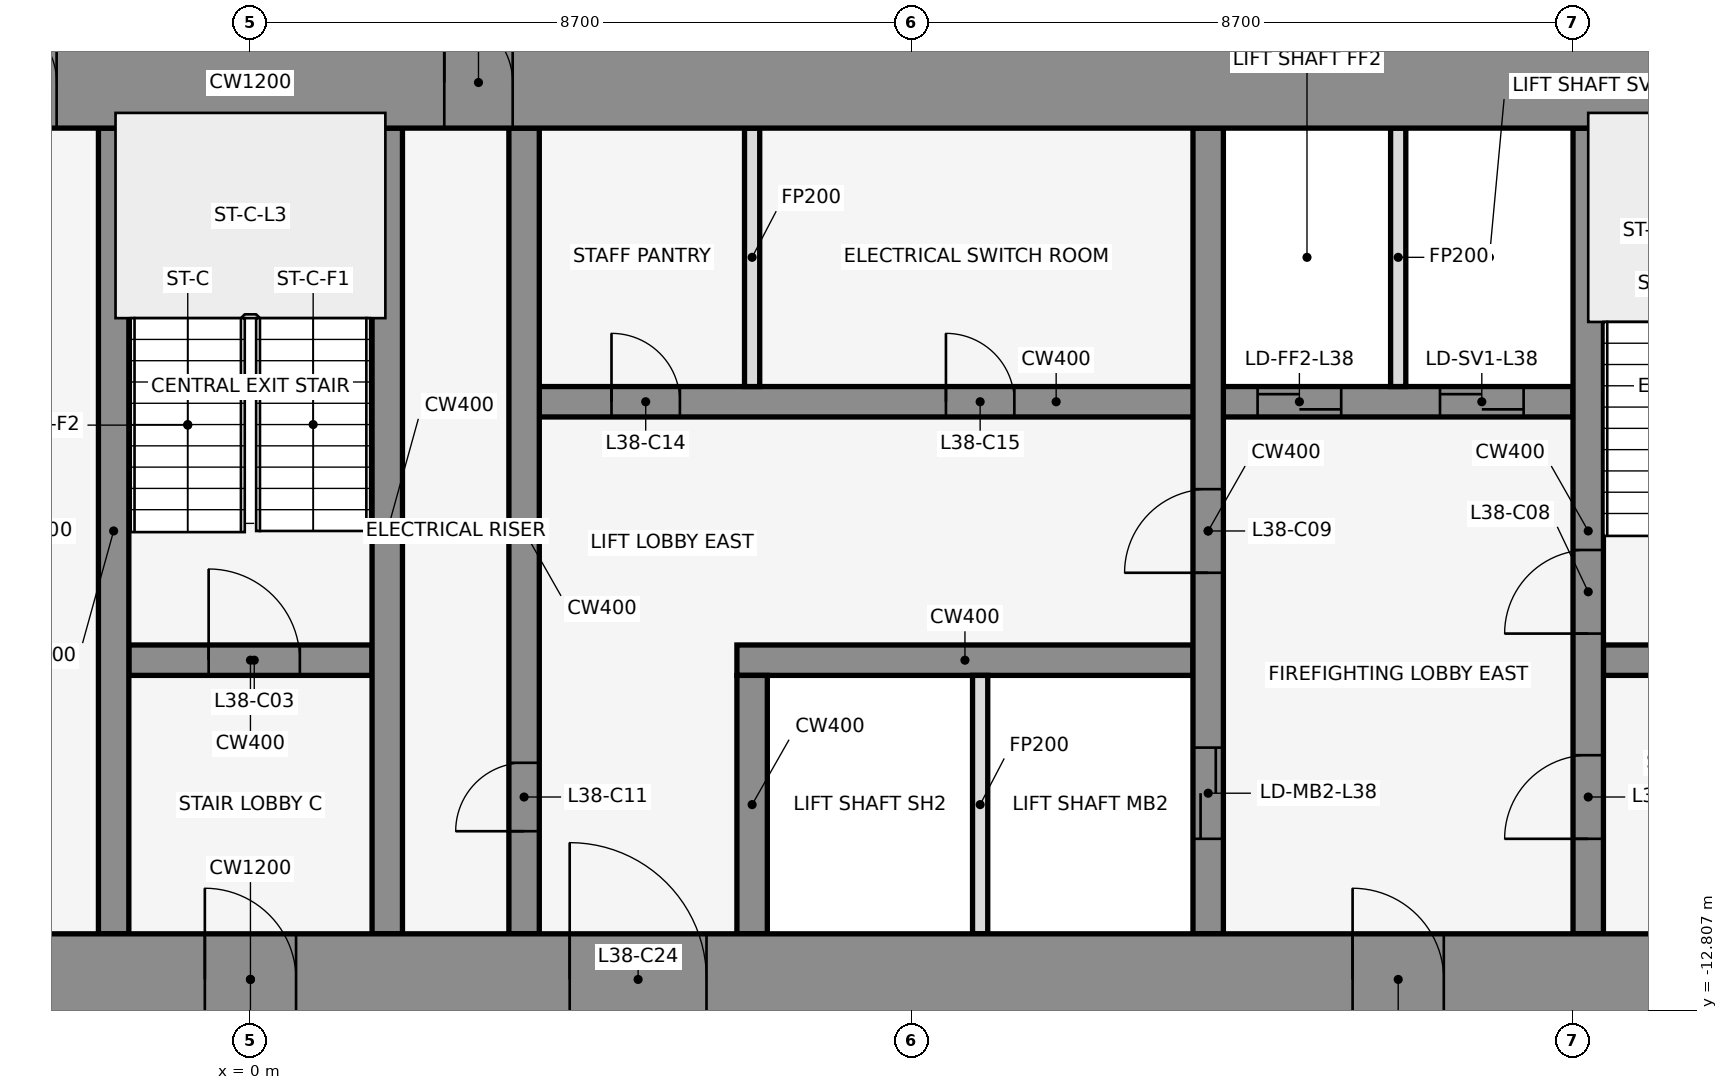
"""IFC4 building model, lengths in metres.
Left out: names, types, materials, properties, quantities, classifications, styles, units other than length and angle.
Written with IfcOpenShell. Run it as: python <this file> out.ifc"""

import sys

from ifc_helpers import new_model, si_unit, direction, frame, frame_2d, origin, place, context, subcontext, project, spatial, rectangle, extrude, element, fill, save


model = new_model("IFC4")
c1 = context("Model", 3, precision=1e-05, world=origin(), true_north=direction((0.0, 1.0)))
c2 = subcontext(c1, "Body", "Model", "MODEL_VIEW")
j1 = project(units=[si_unit("LENGTHUNIT", "METRE"), si_unit("PLANEANGLEUNIT", "RADIAN")], contexts=[c1])
p1 = place(None, origin())
s1 = spatial("IfcSite", under=j1, at=p1, CompositionType="ELEMENT")
p2 = place(p1, origin())
s2 = spatial("IfcBuilding", under=s1, at=p2, CompositionType="ELEMENT")
p3 = place(p2, frame((0.0, 0.0, 173.2)))
s3 = spatial("IfcBuildingStorey", under=s2, at=p3, CompositionType="ELEMENT", Elevation=173.2)
for number, where, z_axis, x_axis in (
    (1, (16.432, -0.105, 0.0), (0.0, 0.0, 1.0), (-0.84, 0.543, 0.0)),
    (2, (1.901, 1.08, 0.0), (0.0, 0.0, 1.0), (-0.84, -0.543, 0.0)),
    (3, (-0.068, -0.105, 0.0), (0.0, 0.0, 1.0), (-0.84, 0.543, 0.0)),
):
    element("IfcWall", number, at=place(p3, frame(where, z_axis=z_axis, x_axis=x_axis)), inside=s3, PredefinedType="STANDARD", context=c2, shape_type="SweptSolid", body=[
        extrude(rectangle(XDim=2.183, YDim=0.25, at=frame_2d((1.091, 0.0))), origin(), (0.0, 0.0, 1.0), 3.95),
    ])
p4 = place(p3, frame((-1.6, -8.2, 0.0), z_axis=(0.0, 0.0, 1.0), x_axis=(1.0, 0.0, 0.0)))
e4 = element("IfcWall", 4, at=p4, inside=s3, PredefinedType="SHEAR", context=c2, shape_type="SweptSolid", body=[
    extrude(rectangle(XDim=3.2, YDim=0.4, at=frame_2d((1.6, 0.0))), origin(), (0.0, 0.0, 1.0), 4.1),
])
p5 = place(p4, frame((1.05, 0.0, 0.0)))
e5 = element("IfcOpeningElement", 5, at=p5, cuts=e4, PredefinedType="OPENING", context=c2, shape_type="SweptSolid", body=[
    extrude(rectangle(XDim=1.2, YDim=2.1, at=frame_2d((0.6, 1.05))), frame((0.0, 0.212, 0.0), z_axis=(0.0, -1.0, 0.0), x_axis=(1.0, 0.0, 0.0)), (0.0, 0.0, 1.0), 0.424),
])
p6 = place(p3, frame((6.4, -8.2, 0.0), z_axis=(0.0, 0.0, 1.0), x_axis=(1.0, 0.0, 0.0)))
e6 = element("IfcWall", 6, at=p6, inside=s3, PredefinedType="SHEAR", context=c2, shape_type="SweptSolid", body=[
    extrude(rectangle(XDim=6.0, YDim=0.4, at=frame_2d((3.0, 0.0))), origin(), (0.0, 0.0, 1.0), 4.1),
])
p7 = place(p3, frame((17.8, -8.2, 0.0), z_axis=(0.0, 0.0, 1.0), x_axis=(1.0, 0.0, 0.0)))
e7 = element("IfcWall", 7, at=p7, inside=s3, PredefinedType="SHEAR", context=c2, shape_type="SweptSolid", body=[
    extrude(rectangle(XDim=3.0, YDim=0.4, at=frame_2d((1.5, 0.0))), origin(), (0.0, 0.0, 1.0), 4.1),
])
p8 = place(p7, frame((0.85, 0.0, 0.0)))
e8 = element("IfcOpeningElement", 8, at=p8, cuts=e7, PredefinedType="OPENING", context=c2, shape_type="SweptSolid", body=[
    extrude(rectangle(XDim=1.2, YDim=2.1, at=frame_2d((0.6, 1.05))), frame((0.0, 0.212, 0.0), z_axis=(0.0, -1.0, 0.0), x_axis=(1.0, 0.0, 0.0)), (0.0, 0.0, 1.0), 0.424),
])
p9 = place(p3, frame((3.8, -4.8, 0.0), z_axis=(0.0, 0.0, 1.0), x_axis=(1.0, 0.0, 0.0)))
e9 = element("IfcWall", 9, at=p9, inside=s3, PredefinedType="SHEAR", context=c2, shape_type="SweptSolid", body=[
    extrude(rectangle(XDim=13.6, YDim=0.4, at=frame_2d((6.8, 0.0))), origin(), (0.0, 0.0, 1.0), 4.1),
])
p10 = place(p9, frame((9.45, 0.0, 0.0)))
e10 = element("IfcOpeningElement", 10, at=p10, cuts=e9, PredefinedType="OPENING", context=c2, shape_type="SweptSolid", body=[
    extrude(rectangle(XDim=1.1, YDim=2.1, at=frame_2d((0.55, 1.05))), frame((0.0, 0.212, 0.0), z_axis=(0.0, -1.0, 0.0), x_axis=(1.0, 0.0, 0.0)), (0.0, 0.0, 1.0), 0.424),
])
p11 = place(p9, frame((11.85, 0.0, 0.0)))
e11 = element("IfcOpeningElement", 11, at=p11, cuts=e9, PredefinedType="OPENING", context=c2, shape_type="SweptSolid", body=[
    extrude(rectangle(XDim=1.1, YDim=2.1, at=frame_2d((0.55, 1.05))), frame((0.0, 0.212, 0.0), z_axis=(0.0, -1.0, 0.0), x_axis=(1.0, 0.0, 0.0)), (0.0, 0.0, 1.0), 0.424),
])
p12 = place(p9, frame((0.95, 0.0, 0.0)))
e12 = element("IfcOpeningElement", 12, at=p12, cuts=e9, PredefinedType="OPENING", context=c2, shape_type="SweptSolid", body=[
    extrude(rectangle(XDim=0.9, YDim=2.1, at=frame_2d((0.45, 1.05))), frame((0.0, 0.212, 0.0), z_axis=(0.0, -1.0, 0.0), x_axis=(1.0, 0.0, 0.0)), (0.0, 0.0, 1.0), 0.424),
])
p13 = place(p9, frame((5.35, 0.0, 0.0)))
e13 = element("IfcOpeningElement", 13, at=p13, cuts=e9, PredefinedType="OPENING", context=c2, shape_type="SweptSolid", body=[
    extrude(rectangle(XDim=0.9, YDim=2.1, at=frame_2d((0.45, 1.05))), frame((0.0, 0.212, 0.0), z_axis=(0.0, -1.0, 0.0), x_axis=(1.0, 0.0, 0.0)), (0.0, 0.0, 1.0), 0.424),
])
for number, where, z_axis, x_axis in (
    (14, (-1.8, -11.8, 0.0), (0.0, 0.0, 1.0), (0.0, 1.0, 0.0)),
    (15, (1.8, -11.8, 0.0), (0.0, 0.0, 1.0), (0.0, 1.0, 0.0)),
):
    element("IfcWall", number, at=place(p3, frame(where, z_axis=z_axis, x_axis=x_axis)), inside=s3, PredefinedType="SHEAR", context=c2, shape_type="SweptSolid", body=[
        extrude(rectangle(XDim=10.6, YDim=0.4, at=frame_2d((5.3, 0.0))), origin(), (0.0, 0.0, 1.0), 4.1),
    ])
p14 = place(p3, frame((3.6, -11.8, 0.0), z_axis=(0.0, 0.0, 1.0), x_axis=(0.0, 1.0, 0.0)))
e16 = element("IfcWall", 16, at=p14, inside=s3, PredefinedType="SHEAR", context=c2, shape_type="SweptSolid", body=[
    extrude(rectangle(XDim=10.6, YDim=0.4, at=frame_2d((5.3, 0.0))), origin(), (0.0, 0.0, 1.0), 4.1),
])
p15 = place(p14, frame((1.35, 0.0, 0.0)))
e17 = element("IfcOpeningElement", 17, at=p15, cuts=e16, PredefinedType="OPENING", context=c2, shape_type="SweptSolid", body=[
    extrude(rectangle(XDim=0.9, YDim=2.1, at=frame_2d((0.45, 1.05))), frame((0.0, 0.212, 0.0), z_axis=(0.0, -1.0, 0.0), x_axis=(1.0, 0.0, 0.0)), (0.0, 0.0, 1.0), 0.424),
])
p16 = place(p3, frame((6.6, -11.8, 0.0), z_axis=(0.0, 0.0, 1.0), x_axis=(0.0, 1.0, 0.0)))
e18 = element("IfcWall", 18, at=p16, inside=s3, PredefinedType="SHEAR", context=c2, shape_type="SweptSolid", body=[
    extrude(rectangle(XDim=3.4, YDim=0.4, at=frame_2d((1.7, 0.0))), origin(), (0.0, 0.0, 1.0), 4.1),
])
for number, where, z_axis, x_axis in (
    (19, (6.6, -4.6, 0.0), (0.0, 0.0, 1.0), (0.0, 1.0, 0.0)),
    (20, (9.6, -11.8, 0.0), (0.0, 0.0, 1.0), (0.0, 1.0, 0.0)),
):
    element("IfcWall", number, at=place(p3, frame(where, z_axis=z_axis, x_axis=x_axis)), inside=s3, PredefinedType="PARTITIONING", context=c2, shape_type="SweptSolid", body=[
        extrude(rectangle(XDim=3.4, YDim=0.2, at=frame_2d((1.7, 0.0))), origin(), (0.0, 0.0, 1.0), 2.84),
    ])
p17 = place(p3, frame((12.6, -11.8, 0.0), z_axis=(0.0, 0.0, 1.0), x_axis=(0.0, 1.0, 0.0)))
e21 = element("IfcWall", 21, at=p17, inside=s3, PredefinedType="SHEAR", context=c2, shape_type="SweptSolid", body=[
    extrude(rectangle(XDim=10.6, YDim=0.4, at=frame_2d((5.3, 0.0))), origin(), (0.0, 0.0, 1.0), 4.1),
])
p18 = place(p17, frame((1.25, 0.0, 0.0)))
e22 = element("IfcOpeningElement", 22, at=p18, cuts=e21, PredefinedType="OPENING", context=c2, shape_type="SweptSolid", body=[
    extrude(rectangle(XDim=1.2, YDim=2.1, at=frame_2d((0.6, 1.05))), frame((0.0, 0.212, 0.0), z_axis=(0.0, -1.0, 0.0), x_axis=(1.0, 0.0, 0.0)), (0.0, 0.0, 1.0), 0.424),
])
p19 = place(p17, frame((4.75, 0.0, 0.0)))
e23 = element("IfcOpeningElement", 23, at=p19, cuts=e21, PredefinedType="OPENING", context=c2, shape_type="SweptSolid", body=[
    extrude(rectangle(XDim=1.1, YDim=2.1, at=frame_2d((0.55, 1.05))), frame((0.0, 0.212, 0.0), z_axis=(0.0, -1.0, 0.0), x_axis=(1.0, 0.0, 0.0)), (0.0, 0.0, 1.0), 0.424),
])
p20 = place(p3, frame((15.1, -4.6, 0.0), z_axis=(0.0, 0.0, 1.0), x_axis=(0.0, 1.0, 0.0)))
e24 = element("IfcWall", 24, at=p20, inside=s3, PredefinedType="PARTITIONING", context=c2, shape_type="SweptSolid", body=[
    extrude(rectangle(XDim=3.4, YDim=0.2, at=frame_2d((1.7, 0.0))), origin(), (0.0, 0.0, 1.0), 2.84),
])
p21 = place(p3, frame((17.6, -11.8, 0.0), z_axis=(0.0, 0.0, 1.0), x_axis=(0.0, 1.0, 0.0)))
e25 = element("IfcWall", 25, at=p21, inside=s3, PredefinedType="SHEAR", context=c2, shape_type="SweptSolid", body=[
    extrude(rectangle(XDim=10.6, YDim=0.4, at=frame_2d((5.3, 0.0))), origin(), (0.0, 0.0, 1.0), 4.1),
])
p22 = place(p21, frame((1.25, 0.0, 0.0)))
e26 = element("IfcOpeningElement", 26, at=p22, cuts=e25, PredefinedType="OPENING", context=c2, shape_type="SweptSolid", body=[
    extrude(rectangle(XDim=1.1, YDim=2.1, at=frame_2d((0.55, 1.05))), frame((0.0, 0.212, 0.0), z_axis=(0.0, -1.0, 0.0), x_axis=(1.0, 0.0, 0.0)), (0.0, 0.0, 1.0), 0.424),
])
p23 = place(p21, frame((3.95, 0.0, 0.0)))
e27 = element("IfcOpeningElement", 27, at=p23, cuts=e25, PredefinedType="OPENING", context=c2, shape_type="SweptSolid", body=[
    extrude(rectangle(XDim=1.1, YDim=2.1, at=frame_2d((0.55, 1.05))), frame((0.0, 0.212, 0.0), z_axis=(0.0, -1.0, 0.0), x_axis=(1.0, 0.0, 0.0)), (0.0, 0.0, 1.0), 0.424),
])
p24 = place(p3, frame((-22.0, -0.6, 0.0), z_axis=(0.0, 0.0, 1.0), x_axis=(1.0, 0.0, 0.0)))
e28 = element("IfcWall", 28, at=p24, inside=s3, PredefinedType="SHEAR", context=c2, shape_type="SweptSolid", body=[
    extrude(rectangle(XDim=44.0, YDim=1.2, at=frame_2d((22.0, 0.0))), origin(), (0.0, 0.0, 1.0), 4.1),
])
p25 = place(p24, frame((18.55, 0.0, 0.0)))
e29 = element("IfcOpeningElement", 29, at=p25, cuts=e28, PredefinedType="OPENING", context=c2, shape_type="SweptSolid", body=[
    extrude(rectangle(XDim=0.9, YDim=2.1, at=frame_2d((0.45, 1.05))), frame((0.0, 0.612, 0.0), z_axis=(0.0, -1.0, 0.0), x_axis=(1.0, 0.0, 0.0)), (0.0, 0.0, 1.0), 1.224),
])
p26 = place(p24, frame((24.55, 0.0, 0.0)))
e30 = element("IfcOpeningElement", 30, at=p26, cuts=e28, PredefinedType="OPENING", context=c2, shape_type="SweptSolid", body=[
    extrude(rectangle(XDim=0.9, YDim=2.1, at=frame_2d((0.45, 1.05))), frame((0.0, 0.612, 0.0), z_axis=(0.0, -1.0, 0.0), x_axis=(1.0, 0.0, 0.0)), (0.0, 0.0, 1.0), 1.224),
])
p27 = place(p3, frame((-22.0, -12.4, 0.0), z_axis=(0.0, 0.0, 1.0), x_axis=(1.0, 0.0, 0.0)))
e31 = element("IfcWall", 31, at=p27, inside=s3, PredefinedType="SHEAR", context=c2, shape_type="SweptSolid", body=[
    extrude(rectangle(XDim=44.0, YDim=1.2, at=frame_2d((22.0, 0.0))), origin(), (0.0, 0.0, 1.0), 4.1),
])
p28 = place(p27, frame((2.2, 0.0, 0.0)))
e32 = element("IfcOpeningElement", 32, at=p28, cuts=e31, PredefinedType="OPENING", context=c2, shape_type="SweptSolid", body=[
    extrude(rectangle(XDim=1.2, YDim=2.1, at=frame_2d((0.6, 1.05))), frame((0.0, 0.612, 0.0), z_axis=(0.0, -1.0, 0.0), x_axis=(1.0, 0.0, 0.0)), (0.0, 0.0, 1.0), 1.224),
])
p29 = place(p27, frame((21.4, 0.0, 0.0)))
e33 = element("IfcOpeningElement", 33, at=p29, cuts=e31, PredefinedType="OPENING", context=c2, shape_type="SweptSolid", body=[
    extrude(rectangle(XDim=1.2, YDim=2.1, at=frame_2d((0.6, 1.05))), frame((0.0, 0.612, 0.0), z_axis=(0.0, -1.0, 0.0), x_axis=(1.0, 0.0, 0.0)), (0.0, 0.0, 1.0), 1.224),
])
p30 = place(p27, frame((40.6, 0.0, 0.0)))
e34 = element("IfcOpeningElement", 34, at=p30, cuts=e31, PredefinedType="OPENING", context=c2, shape_type="SweptSolid", body=[
    extrude(rectangle(XDim=1.2, YDim=2.1, at=frame_2d((0.6, 1.05))), frame((0.0, 0.612, 0.0), z_axis=(0.0, -1.0, 0.0), x_axis=(1.0, 0.0, 0.0)), (0.0, 0.0, 1.0), 1.224),
])
p31 = place(p27, frame((16.0, 0.0, 0.0)))
e35 = element("IfcOpeningElement", 35, at=p31, cuts=e31, PredefinedType="OPENING", context=c2, shape_type="SweptSolid", body=[
    extrude(rectangle(XDim=1.8, YDim=2.1, at=frame_2d((0.9, 1.05))), frame((0.0, 0.612, 0.0), z_axis=(0.0, -1.0, 0.0), x_axis=(1.0, 0.0, 0.0)), (0.0, 0.0, 1.0), 1.224),
])
p32 = place(p27, frame((6.3, 0.0, 0.0)))
e36 = element("IfcOpeningElement", 36, at=p32, cuts=e31, PredefinedType="OPENING", context=c2, shape_type="SweptSolid", body=[
    extrude(rectangle(XDim=1.2, YDim=2.1, at=frame_2d((0.6, 1.05))), frame((0.0, 0.612, 0.0), z_axis=(0.0, -1.0, 0.0), x_axis=(1.0, 0.0, 0.0)), (0.0, 0.0, 1.0), 1.224),
])
p33 = place(p27, frame((26.2, 0.0, 0.0)))
e37 = element("IfcOpeningElement", 37, at=p33, cuts=e31, PredefinedType="OPENING", context=c2, shape_type="SweptSolid", body=[
    extrude(rectangle(XDim=1.8, YDim=2.1, at=frame_2d((0.9, 1.05))), frame((0.0, 0.612, 0.0), z_axis=(0.0, -1.0, 0.0), x_axis=(1.0, 0.0, 0.0)), (0.0, 0.0, 1.0), 1.224),
])
p34 = place(p27, frame((36.5, 0.0, 0.0)))
e38 = element("IfcOpeningElement", 38, at=p34, cuts=e31, PredefinedType="OPENING", context=c2, shape_type="SweptSolid", body=[
    extrude(rectangle(XDim=1.2, YDim=2.1, at=frame_2d((0.6, 1.05))), frame((0.0, 0.612, 0.0), z_axis=(0.0, -1.0, 0.0), x_axis=(1.0, 0.0, 0.0)), (0.0, 0.0, 1.0), 1.224),
])
p35 = place(p5, origin())
e39 = element("IfcDoor", 39, at=p35, inside=s3, OperationType="SINGLE_SWING_LEFT", PredefinedType="DOOR", context=c2, shape_type="SweptSolid", body=[
    extrude(rectangle(XDim=1.2, YDim=2.1, at=frame_2d((0.6, 1.05))), frame((0.0, 0.025, 0.0), z_axis=(0.0, -1.0, 0.0), x_axis=(1.0, 0.0, 0.0)), (0.0, 0.0, 1.0), 0.05),
])
fill(e5, e39)
p36 = place(p22, origin())
e40 = element("IfcDoor", 40, at=p36, inside=s3, OperationType="SINGLE_SWING_LEFT", PredefinedType="DOOR", context=c2, shape_type="SweptSolid", body=[
    extrude(rectangle(XDim=1.1, YDim=2.1, at=frame_2d((0.55, 1.05))), frame((0.0, 0.025, 0.0), z_axis=(0.0, -1.0, 0.0), x_axis=(1.0, 0.0, 0.0)), (0.0, 0.0, 1.0), 0.05),
])
fill(e26, e40)
p37 = place(p18, origin())
e41 = element("IfcDoor", 41, at=p37, inside=s3, OperationType="DOUBLE_DOOR_SLIDING", PredefinedType="DOOR", context=c2, shape_type="SweptSolid", body=[
    extrude(rectangle(XDim=1.2, YDim=2.1, at=frame_2d((0.6, 1.05))), frame((0.0, 0.025, 0.0), z_axis=(0.0, -1.0, 0.0), x_axis=(1.0, 0.0, 0.0)), (0.0, 0.0, 1.0), 0.05),
])
fill(e22, e41)
p38 = place(p10, origin())
e42 = element("IfcDoor", 42, at=p38, inside=s3, OperationType="DOUBLE_DOOR_SLIDING", PredefinedType="DOOR", context=c2, shape_type="SweptSolid", body=[
    extrude(rectangle(XDim=1.1, YDim=2.1, at=frame_2d((0.55, 1.05))), frame((0.0, 0.025, 0.0), z_axis=(0.0, -1.0, 0.0), x_axis=(1.0, 0.0, 0.0)), (0.0, 0.0, 1.0), 0.05),
])
fill(e10, e42)
p39 = place(p11, origin())
e43 = element("IfcDoor", 43, at=p39, inside=s3, OperationType="DOUBLE_DOOR_SLIDING", PredefinedType="DOOR", context=c2, shape_type="SweptSolid", body=[
    extrude(rectangle(XDim=1.1, YDim=2.1, at=frame_2d((0.55, 1.05))), frame((0.0, 0.025, 0.0), z_axis=(0.0, -1.0, 0.0), x_axis=(1.0, 0.0, 0.0)), (0.0, 0.0, 1.0), 0.05),
])
fill(e11, e43)
p40 = place(p23, origin())
e44 = element("IfcDoor", 44, at=p40, inside=s3, OperationType="SINGLE_SWING_RIGHT", PredefinedType="DOOR", context=c2, shape_type="SweptSolid", body=[
    extrude(rectangle(XDim=1.1, YDim=2.1, at=frame_2d((0.55, 1.05))), frame((0.0, 0.025, 0.0), z_axis=(0.0, -1.0, 0.0), x_axis=(1.0, 0.0, 0.0)), (0.0, 0.0, 1.0), 0.05),
])
fill(e27, e44)
p41 = place(p19, frame((1.1, 0.0, 0.0), z_axis=(0.0, 0.0, 1.0), x_axis=(-1.0, 0.0, 0.0)))
e45 = element("IfcDoor", 45, at=p41, inside=s3, OperationType="SINGLE_SWING_RIGHT", PredefinedType="DOOR", context=c2, shape_type="SweptSolid", body=[
    extrude(rectangle(XDim=1.1, YDim=2.1, at=frame_2d((0.55, 1.05))), frame((0.0, 0.025, 0.0), z_axis=(0.0, -1.0, 0.0), x_axis=(1.0, 0.0, 0.0)), (0.0, 0.0, 1.0), 0.05),
])
fill(e23, e45)
p42 = place(p15, origin())
e46 = element("IfcDoor", 46, at=p42, inside=s3, OperationType="SINGLE_SWING_LEFT", PredefinedType="DOOR", context=c2, shape_type="SweptSolid", body=[
    extrude(rectangle(XDim=0.9, YDim=2.1, at=frame_2d((0.45, 1.05))), frame((0.0, 0.025, 0.0), z_axis=(0.0, -1.0, 0.0), x_axis=(1.0, 0.0, 0.0)), (0.0, 0.0, 1.0), 0.05),
])
fill(e17, e46)
p43 = place(p12, origin())
e47 = element("IfcDoor", 47, at=p43, inside=s3, OperationType="SINGLE_SWING_RIGHT", PredefinedType="DOOR", context=c2, shape_type="SweptSolid", body=[
    extrude(rectangle(XDim=0.9, YDim=2.1, at=frame_2d((0.45, 1.05))), frame((0.0, 0.025, 0.0), z_axis=(0.0, -1.0, 0.0), x_axis=(1.0, 0.0, 0.0)), (0.0, 0.0, 1.0), 0.05),
])
fill(e12, e47)
p44 = place(p13, origin())
e48 = element("IfcDoor", 48, at=p44, inside=s3, OperationType="SINGLE_SWING_LEFT", PredefinedType="DOOR", context=c2, shape_type="SweptSolid", body=[
    extrude(rectangle(XDim=0.9, YDim=2.1, at=frame_2d((0.45, 1.05))), frame((0.0, 0.025, 0.0), z_axis=(0.0, -1.0, 0.0), x_axis=(1.0, 0.0, 0.0)), (0.0, 0.0, 1.0), 0.05),
])
fill(e13, e48)
p45 = place(p25, origin())
e49 = element("IfcDoor", 49, at=p45, inside=s3, OperationType="SINGLE_SWING_LEFT", PredefinedType="DOOR", context=c2, shape_type="SweptSolid", body=[
    extrude(rectangle(XDim=0.9, YDim=2.1, at=frame_2d((0.45, 1.05))), frame((0.0, 0.025, 0.0), z_axis=(0.0, -1.0, 0.0), x_axis=(1.0, 0.0, 0.0)), (0.0, 0.0, 1.0), 0.05),
])
fill(e29, e49)
p46 = place(p26, origin())
e50 = element("IfcDoor", 50, at=p46, inside=s3, OperationType="SINGLE_SWING_LEFT", PredefinedType="DOOR", context=c2, shape_type="SweptSolid", body=[
    extrude(rectangle(XDim=0.9, YDim=2.1, at=frame_2d((0.45, 1.05))), frame((0.0, 0.025, 0.0), z_axis=(0.0, -1.0, 0.0), x_axis=(1.0, 0.0, 0.0)), (0.0, 0.0, 1.0), 0.05),
])
fill(e30, e50)
p47 = place(p29, frame((1.2, 0.0, 0.0), z_axis=(0.0, 0.0, 1.0), x_axis=(-1.0, 0.0, 0.0)))
e51 = element("IfcDoor", 51, at=p47, inside=s3, OperationType="SINGLE_SWING_RIGHT", PredefinedType="DOOR", context=c2, shape_type="SweptSolid", body=[
    extrude(rectangle(XDim=1.2, YDim=2.1, at=frame_2d((0.6, 1.05))), frame((0.0, 0.025, 0.0), z_axis=(0.0, -1.0, 0.0), x_axis=(1.0, 0.0, 0.0)), (0.0, 0.0, 1.0), 0.05),
])
fill(e33, e51)
p48 = place(p33, origin())
e52 = element("IfcDoor", 52, at=p48, inside=s3, OperationType="SINGLE_SWING_LEFT", PredefinedType="DOOR", context=c2, shape_type="SweptSolid", body=[
    extrude(rectangle(XDim=1.8, YDim=2.1, at=frame_2d((0.9, 1.05))), frame((0.0, 0.025, 0.0), z_axis=(0.0, -1.0, 0.0), x_axis=(1.0, 0.0, 0.0)), (0.0, 0.0, 1.0), 0.05),
])
fill(e37, e52)
p49 = place(p34, frame((1.2, 0.0, 0.0), z_axis=(0.0, 0.0, 1.0), x_axis=(-1.0, 0.0, 0.0)))
e53 = element("IfcDoor", 53, at=p49, inside=s3, OperationType="SINGLE_SWING_RIGHT", PredefinedType="DOOR", context=c2, shape_type="SweptSolid", body=[
    extrude(rectangle(XDim=1.2, YDim=2.1, at=frame_2d((0.6, 1.05))), frame((0.0, 0.025, 0.0), z_axis=(0.0, -1.0, 0.0), x_axis=(1.0, 0.0, 0.0)), (0.0, 0.0, 1.0), 0.05),
])
fill(e38, e53)
save(model, sys.argv[1])
